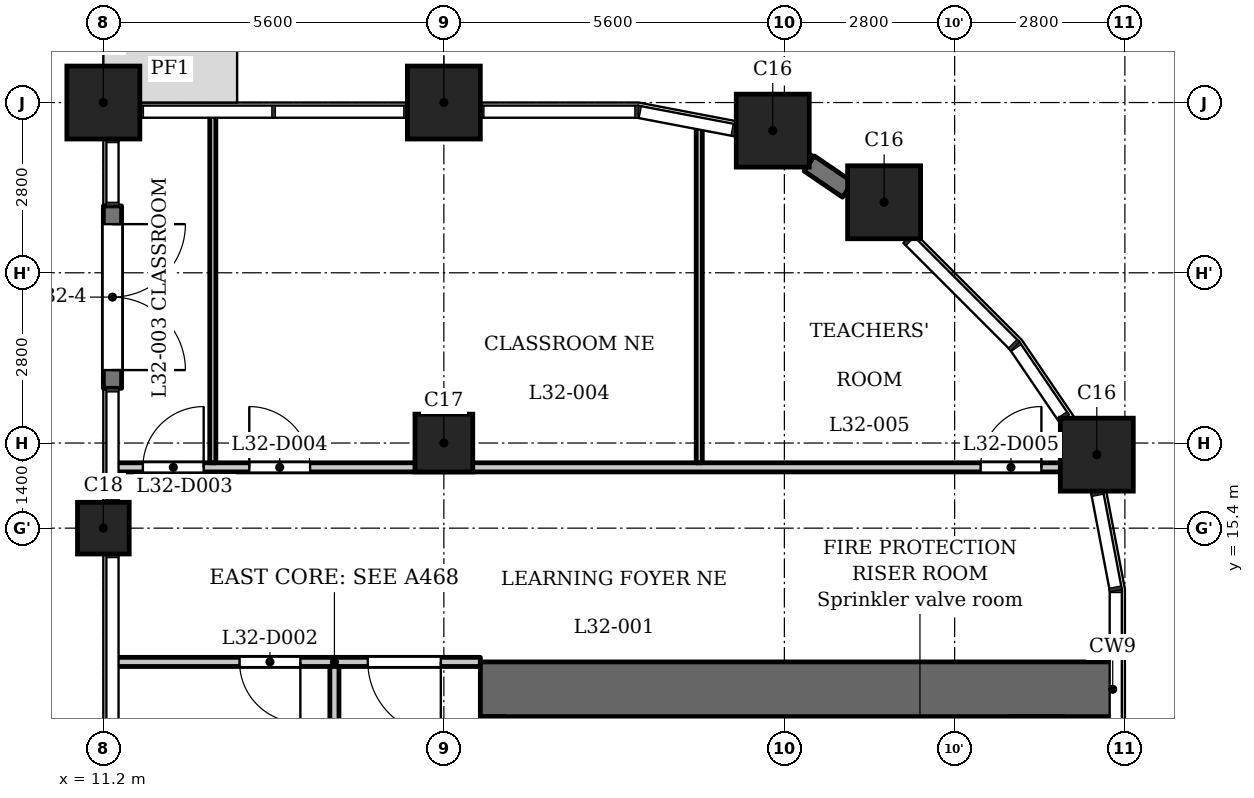
"""IFC4 building model, lengths in metres.
Left out: names, types, materials, properties, quantities, classifications, styles, units other than length and angle.
Written with IfcOpenShell. Run it as: python <this file> out.ifc"""

import sys

from ifc_helpers import new_model, si_unit, direction, frame, frame_2d, origin, origin_2d, place, context, subcontext, project, spatial, rectangle, extrude, element, fill, save


model = new_model("IFC4")
c1 = context("Model", 3, precision=1e-05, world=origin(), true_north=direction((0.0, 1.0)))
c2 = subcontext(c1, "Body", "Model", "MODEL_VIEW")
j1 = project(units=[si_unit("LENGTHUNIT", "METRE"), si_unit("PLANEANGLEUNIT", "RADIAN")], contexts=[c1])
p1 = place(None, origin())
s1 = spatial("IfcSite", under=j1, at=p1, CompositionType="ELEMENT")
p2 = place(p1, origin())
s2 = spatial("IfcBuilding", under=s1, at=p2, CompositionType="ELEMENT")
p3 = place(p2, frame((0.0, 0.0, 125.3)))
s3 = spatial("IfcBuildingStorey", under=s2, at=p3, CompositionType="ELEMENT", Elevation=125.3)
for number, where, z_axis, x_axis in (
    (1, (27.538, 16.609, 0.0), (0.0, 0.0, 1.0), (1.0, 0.0, 0.0)),
    (2, (24.04, 20.76, 0.0), (0.0, 0.0, 1.0), (1.0, 0.0, 0.0)),
    (3, (22.209, 21.938, 0.0), (0.0, 0.0, 1.0), (1.0, 0.0, 0.0)),
    (4, (16.8, 22.4, 0.0), (0.0, 0.0, 1.0), (1.0, 0.0, 0.0)),
    (5, (11.2, 22.4, 0.0), (0.0, 0.0, 1.0), (1.0, 0.0, 0.0)),
):
    element("IfcColumn", number, at=place(p3, frame(where, z_axis=z_axis, x_axis=x_axis)), inside=s3, PredefinedType="COLUMN", context=c2, shape_type="SweptSolid", body=[
        extrude(rectangle(XDim=1.2, YDim=1.2, at=origin_2d()), origin(), (0.0, 0.0, 1.0), 5.4),
    ])
p4 = place(p3, frame((16.8, 16.8, 0.0), z_axis=(0.0, 0.0, 1.0), x_axis=(1.0, 0.0, 0.0)))
e6 = element("IfcColumn", 6, at=p4, inside=s3, PredefinedType="COLUMN", context=c2, shape_type="SweptSolid", body=[
    extrude(rectangle(XDim=0.95, YDim=0.95, at=origin_2d()), origin(), (0.0, 0.0, 1.0), 5.4),
])
p5 = place(p3, frame((11.2, 15.4, 0.0), z_axis=(0.0, 0.0, 1.0), x_axis=(1.0, 0.0, 0.0)))
e7 = element("IfcColumn", 7, at=p5, inside=s3, PredefinedType="COLUMN", context=c2, shape_type="SweptSolid", body=[
    extrude(rectangle(XDim=0.85, YDim=0.85, at=origin_2d()), origin(), (0.0, 0.0, 1.0), 5.4),
])
p6 = place(p3, frame((11.35, 20.7, 0.0), z_axis=(0.0, 0.0, 1.0), x_axis=(0.0, -1.0, 0.0)))
e8 = element("IfcWall", 8, at=p6, inside=s3, PredefinedType="SOLIDWALL", context=c2, shape_type="SweptSolid", body=[
    extrude(rectangle(XDim=3.0, YDim=0.3, at=frame_2d((1.5, 0.0))), origin(), (0.0, 0.0, 1.0), 4.95),
])
p7 = place(p6, frame((0.3, 0.0, 0.0)))
e9 = element("IfcOpeningElement", 9, at=p7, cuts=e8, PredefinedType="OPENING", context=c2, shape_type="SweptSolid", body=[
    extrude(rectangle(XDim=2.4, YDim=2.3, at=frame_2d((1.2, 1.15))), frame((0.0, 0.16, 0.0), z_axis=(0.0, -1.0, 0.0), x_axis=(1.0, 0.0, 0.0)), (0.0, 0.0, 1.0), 0.32),
])
p8 = place(p3, frame((23.44, 20.968, 0.0), z_axis=(0.0, 0.0, 1.0), x_axis=(-0.827098912605, 0.562056392872, 0.0)))
e10 = element("IfcWall", 10, at=p8, inside=s3, PredefinedType="SOLIDWALL", context=c2, shape_type="SweptSolid", body=[
    extrude(rectangle(XDim=0.764, YDim=0.3, at=frame_2d((0.382, 0.0))), origin(), (0.0, 0.0, 1.0), 4.95),
])
p9 = place(p3, frame((17.4, 12.75, 0.0), z_axis=(0.0, 0.0, 1.0), x_axis=(1.0, 0.0, 0.0)))
e11 = element("IfcWall", 11, at=p9, inside=s3, PredefinedType="SHEAR", context=c2, shape_type="SweptSolid", body=[
    extrude(rectangle(XDim=10.4, YDim=0.9, at=frame_2d((5.2, 0.0))), origin(), (0.0, 0.0, 1.0), 4.95),
])
p10 = place(p3, frame((17.6, -12.3, 0.0), z_axis=(0.0, 0.0, 1.0), x_axis=(0.0, 1.0, 0.0)))
e12 = element("IfcWall", 12, at=p10, inside=s3, PredefinedType="SHEAR", context=c2, shape_type="SweptSolid", body=[
    extrude(rectangle(XDim=24.6, YDim=0.4, at=frame_2d((12.3, 0.0))), origin(), (0.0, 0.0, 1.0), 4.95),
])
p11 = place(p10, frame((6.0, 0.0, 0.0)))
e13 = element("IfcOpeningElement", 13, at=p11, cuts=e12, PredefinedType="OPENING", context=c2, shape_type="SweptSolid", body=[
    extrude(rectangle(XDim=1.1, YDim=2.1, at=frame_2d((0.55, 1.05))), frame((0.0, 0.21, 0.0), z_axis=(0.0, -1.0, 0.0), x_axis=(1.0, 0.0, 0.0)), (0.0, 0.0, 1.0), 0.42),
])
p12 = place(p10, frame((8.4, 0.0, 0.0)))
e14 = element("IfcOpeningElement", 14, at=p12, cuts=e12, PredefinedType="OPENING", context=c2, shape_type="SweptSolid", body=[
    extrude(rectangle(XDim=1.1, YDim=2.1, at=frame_2d((0.55, 1.05))), frame((0.0, 0.21, 0.0), z_axis=(0.0, -1.0, 0.0), x_axis=(1.0, 0.0, 0.0)), (0.0, 0.0, 1.0), 0.42),
])
p13 = place(p10, frame((10.8, 0.0, 0.0)))
e15 = element("IfcOpeningElement", 15, at=p13, cuts=e12, PredefinedType="OPENING", context=c2, shape_type="SweptSolid", body=[
    extrude(rectangle(XDim=1.1, YDim=2.1, at=frame_2d((0.55, 1.05))), frame((0.0, 0.21, 0.0), z_axis=(0.0, -1.0, 0.0), x_axis=(1.0, 0.0, 0.0)), (0.0, 0.0, 1.0), 0.42),
])
p14 = place(p10, frame((15.45, 0.0, 0.0)))
e16 = element("IfcOpeningElement", 16, at=p14, cuts=e12, PredefinedType="OPENING", context=c2, shape_type="SweptSolid", body=[
    extrude(rectangle(XDim=1.1, YDim=2.1, at=frame_2d((0.55, 1.05))), frame((0.0, 0.21, 0.0), z_axis=(0.0, -1.0, 0.0), x_axis=(1.0, 0.0, 0.0)), (0.0, 0.0, 1.0), 0.42),
])
p15 = place(p10, frame((17.85, 0.0, 0.0)))
e17 = element("IfcOpeningElement", 17, at=p15, cuts=e12, PredefinedType="OPENING", context=c2, shape_type="SweptSolid", body=[
    extrude(rectangle(XDim=1.1, YDim=2.1, at=frame_2d((0.55, 1.05))), frame((0.0, 0.21, 0.0), z_axis=(0.0, -1.0, 0.0), x_axis=(1.0, 0.0, 0.0)), (0.0, 0.0, 1.0), 0.42),
])
p16 = place(p10, frame((22.8, 0.0, 0.0)))
e18 = element("IfcOpeningElement", 18, at=p16, cuts=e12, PredefinedType="OPENING", context=c2, shape_type="SweptSolid", body=[
    extrude(rectangle(XDim=1.1, YDim=2.1, at=frame_2d((0.55, 1.05))), frame((0.0, 0.21, 0.0), z_axis=(0.0, -1.0, 0.0), x_axis=(1.0, 0.0, 0.0)), (0.0, 0.0, 1.0), 0.42),
])
p17 = place(p10, frame((0.7, 0.0, 0.0)))
e19 = element("IfcOpeningElement", 19, at=p17, cuts=e12, PredefinedType="OPENING", context=c2, shape_type="SweptSolid", body=[
    extrude(rectangle(XDim=1.1, YDim=2.1, at=frame_2d((0.55, 1.05))), frame((0.0, 0.21, 0.0), z_axis=(0.0, -1.0, 0.0), x_axis=(1.0, 0.0, 0.0)), (0.0, 0.0, 1.0), 0.42),
])
p18 = place(p10, frame((12.775, 0.0, 0.0)))
e20 = element("IfcOpeningElement", 20, at=p18, cuts=e12, PredefinedType="OPENING", context=c2, shape_type="SweptSolid", body=[
    extrude(rectangle(XDim=1.8, YDim=2.1, at=frame_2d((0.9, 1.05))), frame((0.0, 0.21, 0.0), z_axis=(0.0, -1.0, 0.0), x_axis=(1.0, 0.0, 0.0)), (0.0, 0.0, 1.0), 0.42),
])
p19 = place(p3, frame((26.55, -12.3, 0.0), z_axis=(0.0, 0.0, 1.0), x_axis=(0.0, 1.0, 0.0)))
e21 = element("IfcWall", 21, at=p19, inside=s3, PredefinedType="SHEAR", context=c2, shape_type="SweptSolid", body=[
    extrude(rectangle(XDim=24.6, YDim=0.9, at=frame_2d((12.3, 0.0))), origin(), (0.0, 0.0, 1.0), 4.95),
])
p20 = place(p3, frame((23.55, 9.8, 0.0), z_axis=(0.0, 0.0, 1.0), x_axis=(0.0, 1.0, 0.0)))
e22 = element("IfcWall", 22, at=p20, inside=s3, PredefinedType="PARTITIONING", context=c2, shape_type="SweptSolid", body=[
    extrude(rectangle(XDim=2.5, YDim=0.2, at=frame_2d((1.25, 0.0))), origin(), (0.0, 0.0, 1.0), 4.95),
])
p21 = place(p20, frame((0.8, 0.0, 0.0)))
e23 = element("IfcOpeningElement", 23, at=p21, cuts=e22, PredefinedType="OPENING", context=c2, shape_type="SweptSolid", body=[
    extrude(rectangle(XDim=0.9, YDim=2.1, at=frame_2d((0.45, 1.05))), frame((0.0, 0.11, 0.0), z_axis=(0.0, -1.0, 0.0), x_axis=(1.0, 0.0, 0.0)), (0.0, 0.0, 1.0), 0.22),
])
p22 = place(p3, frame((11.384, 13.2, 0.0), z_axis=(0.0, 0.0, 1.0), x_axis=(1.0, 0.0, 0.0)))
e24 = element("IfcWall", 24, at=p22, inside=s3, PredefinedType="PARTITIONING", context=c2, shape_type="SweptSolid", body=[
    extrude(rectangle(XDim=6.016, YDim=0.15, at=frame_2d((3.008, 0.0))), origin(), (0.0, 0.0, 1.0), 4.95),
])
p23 = place(p22, frame((4.166, 0.0, 0.0)))
e25 = element("IfcOpeningElement", 25, at=p23, cuts=e24, PredefinedType="OPENING", context=c2, shape_type="SweptSolid", body=[
    extrude(rectangle(XDim=1.2, YDim=2.1, at=frame_2d((0.6, 1.05))), frame((0.0, 0.085, 0.0), z_axis=(0.0, -1.0, 0.0), x_axis=(1.0, 0.0, 0.0)), (0.0, 0.0, 1.0), 0.17),
])
p24 = place(p22, frame((2.056, 0.0, 0.0)))
e26 = element("IfcOpeningElement", 26, at=p24, cuts=e24, PredefinedType="OPENING", context=c2, shape_type="SweptSolid", body=[
    extrude(rectangle(XDim=1.0, YDim=2.1, at=frame_2d((0.5, 1.05))), frame((0.0, 0.085, 0.0), z_axis=(0.0, -1.0, 0.0), x_axis=(1.0, 0.0, 0.0)), (0.0, 0.0, 1.0), 0.17),
])
p25 = place(p3, frame((11.384, 16.4, 0.0), z_axis=(0.0, 0.0, 1.0), x_axis=(1.0, 0.0, 0.0)))
e27 = element("IfcWall", 27, at=p25, inside=s3, PredefinedType="PARTITIONING", context=c2, shape_type="SweptSolid", body=[
    extrude(rectangle(XDim=16.136, YDim=0.15, at=frame_2d((8.068, 0.0))), origin(), (0.0, 0.0, 1.0), 4.95),
])
p26 = place(p25, frame((0.466, 0.0, 0.0)))
e28 = element("IfcOpeningElement", 28, at=p26, cuts=e27, PredefinedType="OPENING", context=c2, shape_type="SweptSolid", body=[
    extrude(rectangle(XDim=1.0, YDim=2.1, at=frame_2d((0.5, 1.05))), frame((0.0, 0.085, 0.0), z_axis=(0.0, -1.0, 0.0), x_axis=(1.0, 0.0, 0.0)), (0.0, 0.0, 1.0), 0.17),
])
p27 = place(p25, frame((2.216, 0.0, 0.0)))
e29 = element("IfcOpeningElement", 29, at=p27, cuts=e27, PredefinedType="OPENING", context=c2, shape_type="SweptSolid", body=[
    extrude(rectangle(XDim=1.0, YDim=2.1, at=frame_2d((0.5, 1.05))), frame((0.0, 0.085, 0.0), z_axis=(0.0, -1.0, 0.0), x_axis=(1.0, 0.0, 0.0)), (0.0, 0.0, 1.0), 0.17),
])
p28 = place(p25, frame((14.243, 0.0, 0.0)))
e30 = element("IfcOpeningElement", 30, at=p28, cuts=e27, PredefinedType="OPENING", context=c2, shape_type="SweptSolid", body=[
    extrude(rectangle(XDim=1.0, YDim=2.1, at=frame_2d((0.5, 1.05))), frame((0.0, 0.085, 0.0), z_axis=(0.0, -1.0, 0.0), x_axis=(1.0, 0.0, 0.0)), (0.0, 0.0, 1.0), 0.17),
])
p29 = place(p3, frame((13.0, 16.475, 0.0), z_axis=(0.0, 0.0, 1.0), x_axis=(0.0, 1.0, 0.0)))
e31 = element("IfcWall", 31, at=p29, inside=s3, PredefinedType="PARTITIONING", context=c2, shape_type="SweptSolid", body=[
    extrude(rectangle(XDim=5.741, YDim=0.1, at=frame_2d((2.871, 0.0))), origin(), (0.0, 0.0, 1.0), 4.95),
])
p30 = place(p3, frame((15.0, 6.769, 0.0), z_axis=(0.0, 0.0, 1.0), x_axis=(0.0, 1.0, 0.0)))
e32 = element("IfcWall", 32, at=p30, inside=s3, PredefinedType="PARTITIONING", context=c2, shape_type="SweptSolid", body=[
    extrude(rectangle(XDim=6.356, YDim=0.15, at=frame_2d((3.178, 0.0))), origin(), (0.0, 0.0, 1.0), 4.95),
])
p31 = place(p3, frame((21.0, 16.475, 0.0), z_axis=(0.0, 0.0, 1.0), x_axis=(0.0, 1.0, 0.0)))
e33 = element("IfcWall", 33, at=p31, inside=s3, PredefinedType="PARTITIONING", context=c2, shape_type="SweptSolid", body=[
    extrude(rectangle(XDim=5.547, YDim=0.1, at=frame_2d((2.773, 0.0))), origin(), (0.0, 0.0, 1.0), 4.95),
])
p32 = place(p7, origin())
e34 = element("IfcDoor", 34, at=p32, inside=s3, OperationType="SINGLE_SWING_LEFT", PredefinedType="DOOR", context=c2, shape_type="SweptSolid", body=[
    extrude(rectangle(XDim=2.4, YDim=2.3, at=frame_2d((1.2, 1.15))), frame((0.0, 0.025, 0.0), z_axis=(0.0, -1.0, 0.0), x_axis=(1.0, 0.0, 0.0)), (0.0, 0.0, 1.0), 0.05),
])
fill(e9, e34)
p33 = place(p23, origin())
e35 = element("IfcDoor", 35, at=p33, inside=s3, OperationType="SINGLE_SWING_RIGHT", PredefinedType="DOOR", context=c2, shape_type="SweptSolid", body=[
    extrude(rectangle(XDim=1.2, YDim=2.1, at=frame_2d((0.6, 1.05))), frame((0.0, 0.025, 0.0), z_axis=(0.0, -1.0, 0.0), x_axis=(1.0, 0.0, 0.0)), (0.0, 0.0, 1.0), 0.05),
])
fill(e25, e35)
p34 = place(p24, origin())
e36 = element("IfcDoor", 36, at=p34, inside=s3, OperationType="SINGLE_SWING_RIGHT", PredefinedType="DOOR", context=c2, shape_type="SweptSolid", body=[
    extrude(rectangle(XDim=1.0, YDim=2.1, at=frame_2d((0.5, 1.05))), frame((0.0, 0.025, 0.0), z_axis=(0.0, -1.0, 0.0), x_axis=(1.0, 0.0, 0.0)), (0.0, 0.0, 1.0), 0.05),
])
fill(e26, e36)
p35 = place(p26, origin())
e37 = element("IfcDoor", 37, at=p35, inside=s3, OperationType="SINGLE_SWING_LEFT", PredefinedType="DOOR", context=c2, shape_type="SweptSolid", body=[
    extrude(rectangle(XDim=1.0, YDim=2.1, at=frame_2d((0.5, 1.05))), frame((0.0, 0.025, 0.0), z_axis=(0.0, -1.0, 0.0), x_axis=(1.0, 0.0, 0.0)), (0.0, 0.0, 1.0), 0.05),
])
fill(e28, e37)
p36 = place(p27, origin())
e38 = element("IfcDoor", 38, at=p36, inside=s3, OperationType="SINGLE_SWING_RIGHT", PredefinedType="DOOR", context=c2, shape_type="SweptSolid", body=[
    extrude(rectangle(XDim=1.0, YDim=2.1, at=frame_2d((0.5, 1.05))), frame((0.0, 0.025, 0.0), z_axis=(0.0, -1.0, 0.0), x_axis=(1.0, 0.0, 0.0)), (0.0, 0.0, 1.0), 0.05),
])
fill(e29, e38)
p37 = place(p28, origin())
e39 = element("IfcDoor", 39, at=p37, inside=s3, OperationType="SINGLE_SWING_LEFT", PredefinedType="DOOR", context=c2, shape_type="SweptSolid", body=[
    extrude(rectangle(XDim=1.0, YDim=2.1, at=frame_2d((0.5, 1.05))), frame((0.0, 0.025, 0.0), z_axis=(0.0, -1.0, 0.0), x_axis=(1.0, 0.0, 0.0)), (0.0, 0.0, 1.0), 0.05),
])
fill(e30, e39)
save(model, sys.argv[1])
